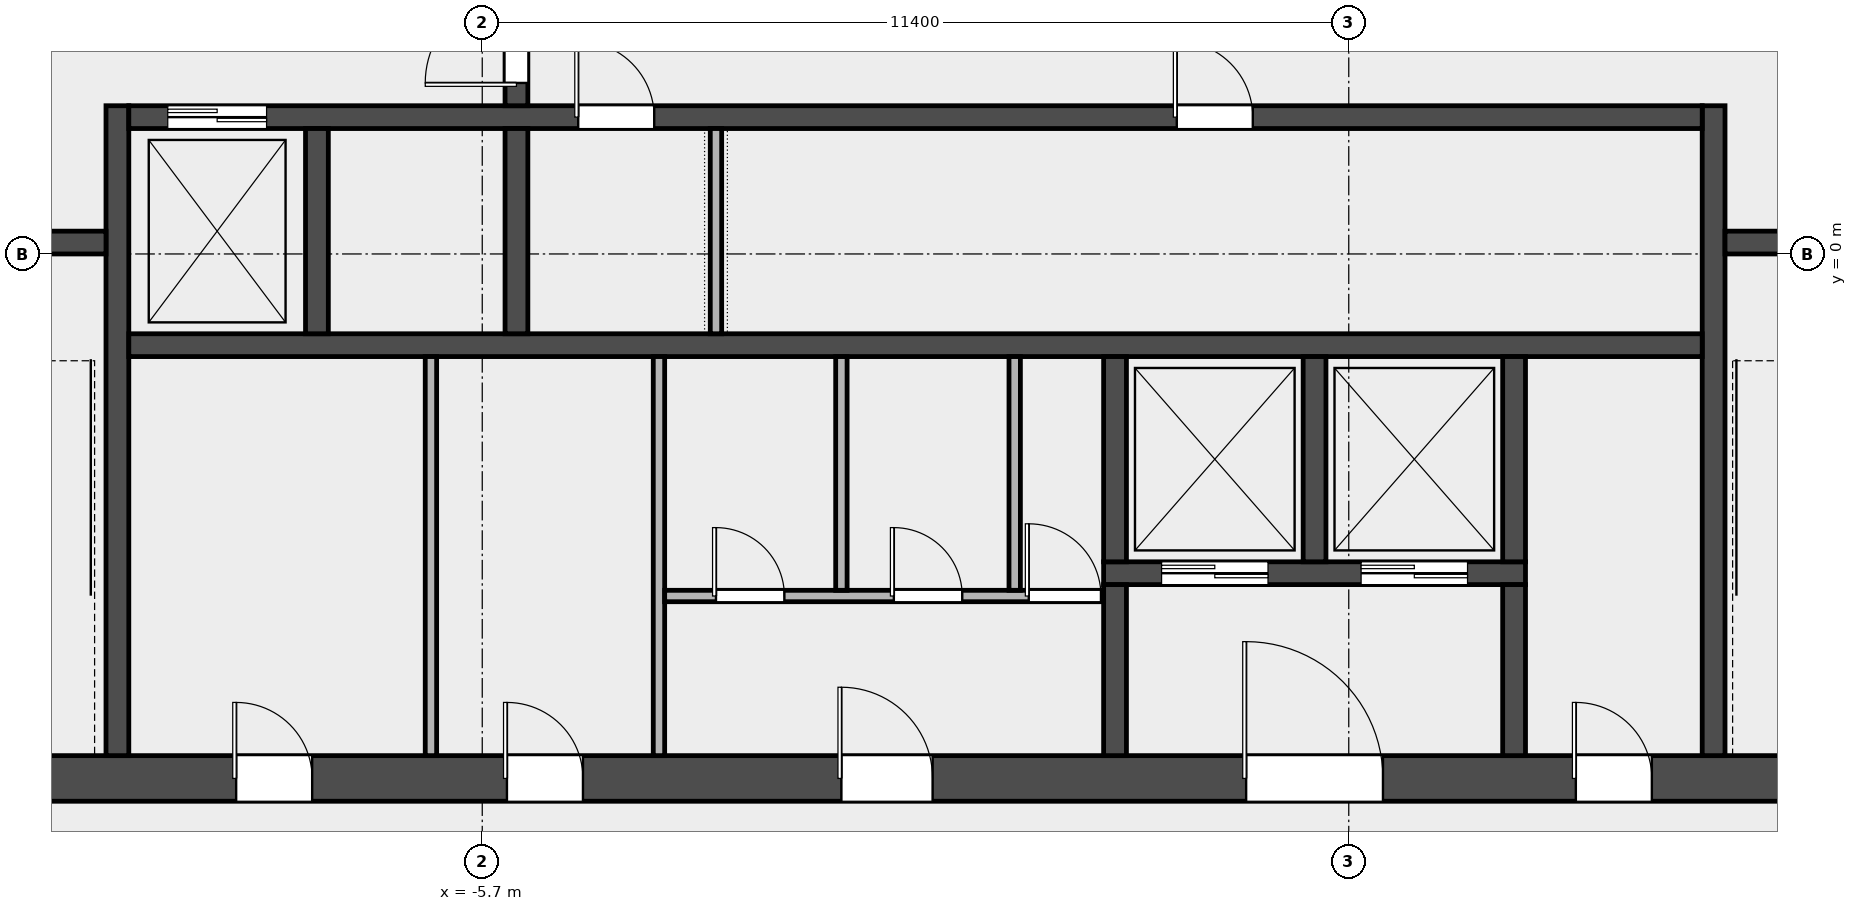
"""IFC4 building model, lengths in metres.
Left out: names, types, materials, properties, quantities, classifications, styles, units other than length and angle.
Written with IfcOpenShell. Run it as: python <this file> out.ifc"""

import sys

from ifc_helpers import new_model, si_unit, direction, frame, frame_2d, origin, place, context, subcontext, project, spatial, rectangle, extrude, element, fill, save


model = new_model("IFC4")
c1 = context("Model", 3, precision=1e-05, world=origin(), true_north=direction((0.0, 1.0)))
c2 = subcontext(c1, "Body", "Model", "MODEL_VIEW")
j1 = project(units=[si_unit("LENGTHUNIT", "METRE"), si_unit("PLANEANGLEUNIT", "RADIAN")], contexts=[c1])
p1 = place(None, origin())
s1 = spatial("IfcSite", under=j1, at=p1, CompositionType="ELEMENT")
p2 = place(p1, origin())
s2 = spatial("IfcBuilding", under=s1, at=p2, CompositionType="ELEMENT")
p3 = place(p2, frame((0.0, 0.0, 321.4)))
s3 = spatial("IfcBuildingStorey", under=s2, at=p3, CompositionType="ELEMENT", Elevation=321.4)
p4 = place(p3, frame((-14.4, -6.9, 0.0), z_axis=(0.0, 0.0, 1.0), x_axis=(1.0, 0.0, 0.0)))
e1 = element("IfcWall", 1, at=p4, inside=s3, PredefinedType="SHEAR", context=c2, shape_type="SweptSolid", body=[
    extrude(rectangle(XDim=28.8, YDim=0.6, at=frame_2d((14.4, 0.0))), origin(), (0.0, 0.0, 1.0), 3.7),
])
p5 = place(p4, frame((5.462, 0.0, 0.0)))
e2 = element("IfcOpeningElement", 2, at=p5, cuts=e1, PredefinedType="OPENING", context=c2, shape_type="SweptSolid", body=[
    extrude(rectangle(XDim=1.0, YDim=2.1, at=frame_2d((0.5, 1.05))), frame((0.0, 0.312, 0.0), z_axis=(0.0, -1.0, 0.0), x_axis=(1.0, 0.0, 0.0)), (0.0, 0.0, 1.0), 0.624),
])
p6 = place(p4, frame((9.025, 0.0, 0.0)))
e3 = element("IfcOpeningElement", 3, at=p6, cuts=e1, PredefinedType="OPENING", context=c2, shape_type="SweptSolid", body=[
    extrude(rectangle(XDim=1.0, YDim=2.1, at=frame_2d((0.5, 1.05))), frame((0.0, 0.312, 0.0), z_axis=(0.0, -1.0, 0.0), x_axis=(1.0, 0.0, 0.0)), (0.0, 0.0, 1.0), 0.624),
])
p7 = place(p4, frame((13.425, 0.0, 0.0)))
e4 = element("IfcOpeningElement", 4, at=p7, cuts=e1, PredefinedType="OPENING", context=c2, shape_type="SweptSolid", body=[
    extrude(rectangle(XDim=1.2, YDim=2.1, at=frame_2d((0.6, 1.05))), frame((0.0, 0.312, 0.0), z_axis=(0.0, -1.0, 0.0), x_axis=(1.0, 0.0, 0.0)), (0.0, 0.0, 1.0), 0.624),
])
p8 = place(p4, frame((18.75, 0.0, 0.0)))
e5 = element("IfcOpeningElement", 5, at=p8, cuts=e1, PredefinedType="OPENING", context=c2, shape_type="SweptSolid", body=[
    extrude(rectangle(XDim=1.8, YDim=2.1, at=frame_2d((0.9, 1.05))), frame((0.0, 0.312, 0.0), z_axis=(0.0, -1.0, 0.0), x_axis=(1.0, 0.0, 0.0)), (0.0, 0.0, 1.0), 0.624),
])
p9 = place(p4, frame((23.087, 0.0, 0.0)))
e6 = element("IfcOpeningElement", 6, at=p9, cuts=e1, PredefinedType="OPENING", context=c2, shape_type="SweptSolid", body=[
    extrude(rectangle(XDim=1.0, YDim=2.1, at=frame_2d((0.5, 1.05))), frame((0.0, 0.312, 0.0), z_axis=(0.0, -1.0, 0.0), x_axis=(1.0, 0.0, 0.0)), (0.0, 0.0, 1.0), 0.624),
])
for number, where, z_axis, x_axis in (
    (7, (-10.5, -6.6, 0.0), (0.0, 0.0, 1.0), (0.0, 1.0, 0.0)),
    (8, (10.5, -6.6, 0.0), (0.0, 0.0, 1.0), (0.0, 1.0, 0.0)),
):
    element("IfcWall", number, at=place(p3, frame(where, z_axis=z_axis, x_axis=x_axis)), inside=s3, PredefinedType="SHEAR", context=c2, shape_type="SweptSolid", body=[
        extrude(rectangle(XDim=8.55, YDim=0.3, at=frame_2d((4.275, 0.0))), origin(), (0.0, 0.0, 1.0), 3.7),
    ])
p10 = place(p3, frame((-13.8, 0.15, 0.0), z_axis=(0.0, 0.0, 1.0), x_axis=(1.0, 0.0, 0.0)))
e9 = element("IfcWall", 9, at=p10, inside=s3, PredefinedType="SOLIDWALL", context=c2, shape_type="SweptSolid", body=[
    extrude(rectangle(XDim=3.15, YDim=0.3, at=frame_2d((1.575, 0.0))), origin(), (0.0, 0.0, 1.0), 3.7),
])
p11 = place(p10, frame((0.975, 0.0, 0.0)))
e10 = element("IfcOpeningElement", 10, at=p11, cuts=e9, PredefinedType="OPENING", context=c2, shape_type="SweptSolid", body=[
    extrude(rectangle(XDim=1.1, YDim=2.1, at=frame_2d((0.55, 1.05))), frame((0.0, 0.162, 0.0), z_axis=(0.0, -1.0, 0.0), x_axis=(1.0, 0.0, 0.0)), (0.0, 0.0, 1.0), 0.324),
])
p12 = place(p3, frame((10.65, 0.15, 0.0), z_axis=(0.0, 0.0, 1.0), x_axis=(1.0, 0.0, 0.0)))
e11 = element("IfcWall", 11, at=p12, inside=s3, PredefinedType="SOLIDWALL", context=c2, shape_type="SweptSolid", body=[
    extrude(rectangle(XDim=3.15, YDim=0.3, at=frame_2d((1.575, 0.0))), origin(), (0.0, 0.0, 1.0), 3.7),
])
p13 = place(p12, frame((1.025, 0.0, 0.0)))
e12 = element("IfcOpeningElement", 12, at=p13, cuts=e11, PredefinedType="OPENING", context=c2, shape_type="SweptSolid", body=[
    extrude(rectangle(XDim=1.1, YDim=2.1, at=frame_2d((0.55, 1.05))), frame((0.0, 0.162, 0.0), z_axis=(0.0, -1.0, 0.0), x_axis=(1.0, 0.0, 0.0)), (0.0, 0.0, 1.0), 0.324),
])
p14 = place(p3, frame((-10.35, -1.2, 0.0), z_axis=(0.0, 0.0, 1.0), x_axis=(1.0, 0.0, 0.0)))
e13 = element("IfcWall", 13, at=p14, inside=s3, PredefinedType="SOLIDWALL", context=c2, shape_type="SweptSolid", body=[
    extrude(rectangle(XDim=20.7, YDim=0.3, at=frame_2d((10.35, 0.0))), origin(), (0.0, 0.0, 1.0), 3.7),
])
p15 = place(p3, frame((-10.35, 1.8, 0.0), z_axis=(0.0, 0.0, 1.0), x_axis=(1.0, 0.0, 0.0)))
e14 = element("IfcWall", 14, at=p15, inside=s3, PredefinedType="SOLIDWALL", context=c2, shape_type="SweptSolid", body=[
    extrude(rectangle(XDim=20.7, YDim=0.3, at=frame_2d((10.35, 0.0))), origin(), (0.0, 0.0, 1.0), 3.7),
])
p16 = place(p15, frame((0.512, 0.0, 0.0)))
e15 = element("IfcOpeningElement", 15, at=p16, cuts=e14, PredefinedType="OPENING", context=c2, shape_type="SweptSolid", body=[
    extrude(rectangle(XDim=1.3, YDim=2.1, at=frame_2d((0.65, 1.05))), frame((0.0, 0.162, 0.0), z_axis=(0.0, -1.0, 0.0), x_axis=(1.0, 0.0, 0.0)), (0.0, 0.0, 1.0), 0.324),
])
p17 = place(p15, frame((5.913, 0.0, 0.0)))
e16 = element("IfcOpeningElement", 16, at=p17, cuts=e14, PredefinedType="OPENING", context=c2, shape_type="SweptSolid", body=[
    extrude(rectangle(XDim=1.0, YDim=2.1, at=frame_2d((0.5, 1.05))), frame((0.0, 0.162, 0.0), z_axis=(0.0, -1.0, 0.0), x_axis=(1.0, 0.0, 0.0)), (0.0, 0.0, 1.0), 0.324),
])
p18 = place(p15, frame((13.788, 0.0, 0.0)))
e17 = element("IfcOpeningElement", 17, at=p18, cuts=e14, PredefinedType="OPENING", context=c2, shape_type="SweptSolid", body=[
    extrude(rectangle(XDim=1.0, YDim=2.1, at=frame_2d((0.5, 1.05))), frame((0.0, 0.162, 0.0), z_axis=(0.0, -1.0, 0.0), x_axis=(1.0, 0.0, 0.0)), (0.0, 0.0, 1.0), 0.324),
])
for number, where, z_axis, x_axis in (
    (18, (-7.875, -1.05, 0.0), (0.0, 0.0, 1.0), (0.0, 1.0, 0.0)),
    (19, (-5.25, -1.05, 0.0), (0.0, 0.0, 1.0), (0.0, 1.0, 0.0)),
):
    element("IfcWall", number, at=place(p3, frame(where, z_axis=z_axis, x_axis=x_axis)), inside=s3, PredefinedType="SOLIDWALL", context=c2, shape_type="SweptSolid", body=[
        extrude(rectangle(XDim=2.7, YDim=0.3, at=frame_2d((1.35, 0.0))), origin(), (0.0, 0.0, 1.0), 3.7),
    ])
p19 = place(p3, frame((-5.25, 1.95, 0.0), z_axis=(0.0, 0.0, 1.0), x_axis=(0.0, 1.0, 0.0)))
e20 = element("IfcWall", 20, at=p19, inside=s3, PredefinedType="SOLIDWALL", context=c2, shape_type="SweptSolid", body=[
    extrude(rectangle(XDim=3.3, YDim=0.3, at=frame_2d((1.65, 0.0))), origin(), (0.0, 0.0, 1.0), 3.7),
])
p20 = place(p19, frame((0.3, 0.0, 0.0)))
e21 = element("IfcOpeningElement", 21, at=p20, cuts=e20, PredefinedType="OPENING", context=c2, shape_type="SweptSolid", body=[
    extrude(rectangle(XDim=1.2, YDim=2.1, at=frame_2d((0.6, 1.05))), frame((0.0, 0.162, 0.0), z_axis=(0.0, -1.0, 0.0), x_axis=(1.0, 0.0, 0.0)), (0.0, 0.0, 1.0), 0.324),
])
p21 = place(p19, frame((1.8, 0.0, 0.0)))
e22 = element("IfcOpeningElement", 22, at=p21, cuts=e20, PredefinedType="OPENING", context=c2, shape_type="SweptSolid", body=[
    extrude(rectangle(XDim=1.2, YDim=2.1, at=frame_2d((0.6, 1.05))), frame((0.0, 0.162, 0.0), z_axis=(0.0, -1.0, 0.0), x_axis=(1.0, 0.0, 0.0)), (0.0, 0.0, 1.0), 0.324),
])
p22 = place(p3, frame((2.475, -4.2, 0.0), z_axis=(0.0, 0.0, 1.0), x_axis=(1.0, 0.0, 0.0)))
e23 = element("IfcWall", 23, at=p22, inside=s3, PredefinedType="SOLIDWALL", context=c2, shape_type="SweptSolid", body=[
    extrude(rectangle(XDim=5.55, YDim=0.3, at=frame_2d((2.775, 0.0))), origin(), (0.0, 0.0, 1.0), 3.7),
])
p23 = place(p22, frame((0.762, 0.0, 0.0)))
e24 = element("IfcOpeningElement", 24, at=p23, cuts=e23, PredefinedType="OPENING", context=c2, shape_type="SweptSolid", body=[
    extrude(rectangle(XDim=1.4, YDim=2.1, at=frame_2d((0.7, 1.05))), frame((0.0, 0.162, 0.0), z_axis=(0.0, -1.0, 0.0), x_axis=(1.0, 0.0, 0.0)), (0.0, 0.0, 1.0), 0.324),
])
p24 = place(p22, frame((3.387, 0.0, 0.0)))
e25 = element("IfcOpeningElement", 25, at=p24, cuts=e23, PredefinedType="OPENING", context=c2, shape_type="SweptSolid", body=[
    extrude(rectangle(XDim=1.4, YDim=2.1, at=frame_2d((0.7, 1.05))), frame((0.0, 0.162, 0.0), z_axis=(0.0, -1.0, 0.0), x_axis=(1.0, 0.0, 0.0)), (0.0, 0.0, 1.0), 0.324),
])
p25 = place(p3, frame((2.625, -4.05, 0.0), z_axis=(0.0, 0.0, 1.0), x_axis=(0.0, 1.0, 0.0)))
e26 = element("IfcWall", 26, at=p25, inside=s3, PredefinedType="SOLIDWALL", context=c2, shape_type="SweptSolid", body=[
    extrude(rectangle(XDim=2.7, YDim=0.3, at=frame_2d((1.35, 0.0))), origin(), (0.0, 0.0, 1.0), 3.7),
])
p26 = place(p3, frame((2.625, -6.6, 0.0), z_axis=(0.0, 0.0, 1.0), x_axis=(0.0, 1.0, 0.0)))
e27 = element("IfcWall", 27, at=p26, inside=s3, PredefinedType="SOLIDWALL", context=c2, shape_type="SweptSolid", body=[
    extrude(rectangle(XDim=2.25, YDim=0.3, at=frame_2d((1.125, 0.0))), origin(), (0.0, 0.0, 1.0), 3.7),
])
for number, where, z_axis, x_axis in (
    (28, (5.25, -4.05, 0.0), (0.0, 0.0, 1.0), (0.0, 1.0, 0.0)),
    (29, (7.875, -4.05, 0.0), (0.0, 0.0, 1.0), (0.0, 1.0, 0.0)),
):
    element("IfcWall", number, at=place(p3, frame(where, z_axis=z_axis, x_axis=x_axis)), inside=s3, PredefinedType="SOLIDWALL", context=c2, shape_type="SweptSolid", body=[
        extrude(rectangle(XDim=2.7, YDim=0.3, at=frame_2d((1.35, 0.0))), origin(), (0.0, 0.0, 1.0), 3.7),
    ])
p27 = place(p3, frame((7.875, -6.6, 0.0), z_axis=(0.0, 0.0, 1.0), x_axis=(0.0, 1.0, 0.0)))
e30 = element("IfcWall", 30, at=p27, inside=s3, PredefinedType="SOLIDWALL", context=c2, shape_type="SweptSolid", body=[
    extrude(rectangle(XDim=2.25, YDim=0.3, at=frame_2d((1.125, 0.0))), origin(), (0.0, 0.0, 1.0), 3.7),
])
for number, where, z_axis, x_axis in (
    (31, (-6.375, -6.6, 0.0), (0.0, 0.0, 1.0), (0.0, 1.0, 0.0)),
    (32, (-3.375, -6.6, 0.0), (0.0, 0.0, 1.0), (0.0, 1.0, 0.0)),
):
    element("IfcWall", number, at=place(p3, frame(where, z_axis=z_axis, x_axis=x_axis)), inside=s3, PredefinedType="PARTITIONING", context=c2, shape_type="SweptSolid", body=[
        extrude(rectangle(XDim=5.25, YDim=0.15, at=frame_2d((2.625, 0.0))), origin(), (0.0, 0.0, 1.0), 3.7),
    ])
p28 = place(p3, frame((-3.3, -4.5, 0.0), z_axis=(0.0, 0.0, 1.0), x_axis=(1.0, 0.0, 0.0)))
e33 = element("IfcWall", 33, at=p28, inside=s3, PredefinedType="PARTITIONING", context=c2, shape_type="SweptSolid", body=[
    extrude(rectangle(XDim=5.775, YDim=0.15, at=frame_2d((2.888, 0.0))), origin(), (0.0, 0.0, 1.0), 3.7),
])
p29 = place(p28, frame((0.675, 0.0, 0.0)))
e34 = element("IfcOpeningElement", 34, at=p29, cuts=e33, PredefinedType="OPENING", context=c2, shape_type="SweptSolid", body=[
    extrude(rectangle(XDim=0.9, YDim=2.1, at=frame_2d((0.45, 1.05))), frame((0.0, 0.087, 0.0), z_axis=(0.0, -1.0, 0.0), x_axis=(1.0, 0.0, 0.0)), (0.0, 0.0, 1.0), 0.174),
])
p30 = place(p28, frame((3.015, 0.0, 0.0)))
e35 = element("IfcOpeningElement", 35, at=p30, cuts=e33, PredefinedType="OPENING", context=c2, shape_type="SweptSolid", body=[
    extrude(rectangle(XDim=0.9, YDim=2.1, at=frame_2d((0.45, 1.05))), frame((0.0, 0.087, 0.0), z_axis=(0.0, -1.0, 0.0), x_axis=(1.0, 0.0, 0.0)), (0.0, 0.0, 1.0), 0.174),
])
p31 = place(p28, frame((4.79, 0.0, 0.0)))
e36 = element("IfcOpeningElement", 36, at=p31, cuts=e33, PredefinedType="OPENING", context=c2, shape_type="SweptSolid", body=[
    extrude(rectangle(XDim=0.95, YDim=2.1, at=frame_2d((0.475, 1.05))), frame((0.0, 0.087, 0.0), z_axis=(0.0, -1.0, 0.0), x_axis=(1.0, 0.0, 0.0)), (0.0, 0.0, 1.0), 0.174),
])
for number, where, z_axis, x_axis in (
    (37, (-0.975, -4.425, 0.0), (0.0, 0.0, 1.0), (0.0, 1.0, 0.0)),
    (38, (1.305, -4.425, 0.0), (0.0, 0.0, 1.0), (0.0, 1.0, 0.0)),
):
    element("IfcWall", number, at=place(p3, frame(where, z_axis=z_axis, x_axis=x_axis)), inside=s3, PredefinedType="PARTITIONING", context=c2, shape_type="SweptSolid", body=[
        extrude(rectangle(XDim=3.075, YDim=0.15, at=frame_2d((1.538, 0.0))), origin(), (0.0, 0.0, 1.0), 3.7),
    ])
p32 = place(p3, frame((-2.625, -1.05, 0.0), z_axis=(0.0, 0.0, 1.0), x_axis=(0.0, 1.0, 0.0)))
e39 = element("IfcWall", 39, at=p32, inside=s3, PredefinedType="PARTITIONING", context=c2, shape_type="SweptSolid", body=[
    extrude(rectangle(XDim=2.7, YDim=0.15, at=frame_2d((1.35, 0.0))), origin(), (0.0, 0.0, 1.0), 3.7),
])
p33 = place(p20, origin())
e40 = element("IfcDoor", 40, at=p33, inside=s3, OperationType="SINGLE_SWING_LEFT", PredefinedType="DOOR", context=c2, shape_type="SweptSolid", body=[
    extrude(rectangle(XDim=1.2, YDim=2.1, at=frame_2d((0.6, 1.05))), frame((0.0, 0.025, 0.0), z_axis=(0.0, -1.0, 0.0), x_axis=(1.0, 0.0, 0.0)), (0.0, 0.0, 1.0), 0.05),
])
fill(e21, e40)
p34 = place(p16, origin())
e41 = element("IfcDoor", 41, at=p34, inside=s3, OperationType="DOUBLE_DOOR_SLIDING", PredefinedType="DOOR", context=c2, shape_type="SweptSolid", body=[
    extrude(rectangle(XDim=1.3, YDim=2.1, at=frame_2d((0.65, 1.05))), frame((0.0, 0.025, 0.0), z_axis=(0.0, -1.0, 0.0), x_axis=(1.0, 0.0, 0.0)), (0.0, 0.0, 1.0), 0.05),
])
fill(e15, e41)
p35 = place(p23, origin())
e42 = element("IfcDoor", 42, at=p35, inside=s3, OperationType="DOUBLE_DOOR_SLIDING", PredefinedType="DOOR", context=c2, shape_type="SweptSolid", body=[
    extrude(rectangle(XDim=1.4, YDim=2.1, at=frame_2d((0.7, 1.05))), frame((0.0, 0.025, 0.0), z_axis=(0.0, -1.0, 0.0), x_axis=(1.0, 0.0, 0.0)), (0.0, 0.0, 1.0), 0.05),
])
fill(e24, e42)
p36 = place(p24, origin())
e43 = element("IfcDoor", 43, at=p36, inside=s3, OperationType="DOUBLE_DOOR_SLIDING", PredefinedType="DOOR", context=c2, shape_type="SweptSolid", body=[
    extrude(rectangle(XDim=1.4, YDim=2.1, at=frame_2d((0.7, 1.05))), frame((0.0, 0.025, 0.0), z_axis=(0.0, -1.0, 0.0), x_axis=(1.0, 0.0, 0.0)), (0.0, 0.0, 1.0), 0.05),
])
fill(e25, e43)
p37 = place(p5, origin())
e44 = element("IfcDoor", 44, at=p37, inside=s3, OperationType="SINGLE_SWING_LEFT", PredefinedType="DOOR", context=c2, shape_type="SweptSolid", body=[
    extrude(rectangle(XDim=1.0, YDim=2.1, at=frame_2d((0.5, 1.05))), frame((0.0, 0.025, 0.0), z_axis=(0.0, -1.0, 0.0), x_axis=(1.0, 0.0, 0.0)), (0.0, 0.0, 1.0), 0.05),
])
fill(e2, e44)
p38 = place(p6, origin())
e45 = element("IfcDoor", 45, at=p38, inside=s3, OperationType="SINGLE_SWING_LEFT", PredefinedType="DOOR", context=c2, shape_type="SweptSolid", body=[
    extrude(rectangle(XDim=1.0, YDim=2.1, at=frame_2d((0.5, 1.05))), frame((0.0, 0.025, 0.0), z_axis=(0.0, -1.0, 0.0), x_axis=(1.0, 0.0, 0.0)), (0.0, 0.0, 1.0), 0.05),
])
fill(e3, e45)
p39 = place(p7, origin())
e46 = element("IfcDoor", 46, at=p39, inside=s3, OperationType="SINGLE_SWING_LEFT", PredefinedType="DOOR", context=c2, shape_type="SweptSolid", body=[
    extrude(rectangle(XDim=1.2, YDim=2.1, at=frame_2d((0.6, 1.05))), frame((0.0, 0.025, 0.0), z_axis=(0.0, -1.0, 0.0), x_axis=(1.0, 0.0, 0.0)), (0.0, 0.0, 1.0), 0.05),
])
fill(e4, e46)
p40 = place(p29, origin())
e47 = element("IfcDoor", 47, at=p40, inside=s3, OperationType="SINGLE_SWING_LEFT", PredefinedType="DOOR", context=c2, shape_type="SweptSolid", body=[
    extrude(rectangle(XDim=0.9, YDim=2.1, at=frame_2d((0.45, 1.05))), frame((0.0, 0.025, 0.0), z_axis=(0.0, -1.0, 0.0), x_axis=(1.0, 0.0, 0.0)), (0.0, 0.0, 1.0), 0.05),
])
fill(e34, e47)
p41 = place(p30, origin())
e48 = element("IfcDoor", 48, at=p41, inside=s3, OperationType="SINGLE_SWING_LEFT", PredefinedType="DOOR", context=c2, shape_type="SweptSolid", body=[
    extrude(rectangle(XDim=0.9, YDim=2.1, at=frame_2d((0.45, 1.05))), frame((0.0, 0.025, 0.0), z_axis=(0.0, -1.0, 0.0), x_axis=(1.0, 0.0, 0.0)), (0.0, 0.0, 1.0), 0.05),
])
fill(e35, e48)
p42 = place(p31, origin())
e49 = element("IfcDoor", 49, at=p42, inside=s3, OperationType="SINGLE_SWING_LEFT", PredefinedType="DOOR", context=c2, shape_type="SweptSolid", body=[
    extrude(rectangle(XDim=0.95, YDim=2.1, at=frame_2d((0.475, 1.05))), frame((0.0, 0.025, 0.0), z_axis=(0.0, -1.0, 0.0), x_axis=(1.0, 0.0, 0.0)), (0.0, 0.0, 1.0), 0.05),
])
fill(e36, e49)
p43 = place(p8, origin())
e50 = element("IfcDoor", 50, at=p43, inside=s3, OperationType="DOUBLE_DOOR_SINGLE_SWING", PredefinedType="DOOR", context=c2, shape_type="SweptSolid", body=[
    extrude(rectangle(XDim=1.8, YDim=2.1, at=frame_2d((0.9, 1.05))), frame((0.0, 0.025, 0.0), z_axis=(0.0, -1.0, 0.0), x_axis=(1.0, 0.0, 0.0)), (0.0, 0.0, 1.0), 0.05),
])
fill(e5, e50)
p44 = place(p9, origin())
e51 = element("IfcDoor", 51, at=p44, inside=s3, OperationType="SINGLE_SWING_LEFT", PredefinedType="DOOR", context=c2, shape_type="SweptSolid", body=[
    extrude(rectangle(XDim=1.0, YDim=2.1, at=frame_2d((0.5, 1.05))), frame((0.0, 0.025, 0.0), z_axis=(0.0, -1.0, 0.0), x_axis=(1.0, 0.0, 0.0)), (0.0, 0.0, 1.0), 0.05),
])
fill(e6, e51)
p45 = place(p17, origin())
e52 = element("IfcDoor", 52, at=p45, inside=s3, OperationType="SINGLE_SWING_LEFT", PredefinedType="DOOR", context=c2, shape_type="SweptSolid", body=[
    extrude(rectangle(XDim=1.0, YDim=2.1, at=frame_2d((0.5, 1.05))), frame((0.0, 0.025, 0.0), z_axis=(0.0, -1.0, 0.0), x_axis=(1.0, 0.0, 0.0)), (0.0, 0.0, 1.0), 0.05),
])
fill(e16, e52)
p46 = place(p18, origin())
e53 = element("IfcDoor", 53, at=p46, inside=s3, OperationType="SINGLE_SWING_LEFT", PredefinedType="DOOR", context=c2, shape_type="SweptSolid", body=[
    extrude(rectangle(XDim=1.0, YDim=2.1, at=frame_2d((0.5, 1.05))), frame((0.0, 0.025, 0.0), z_axis=(0.0, -1.0, 0.0), x_axis=(1.0, 0.0, 0.0)), (0.0, 0.0, 1.0), 0.05),
])
fill(e17, e53)
save(model, sys.argv[1])
